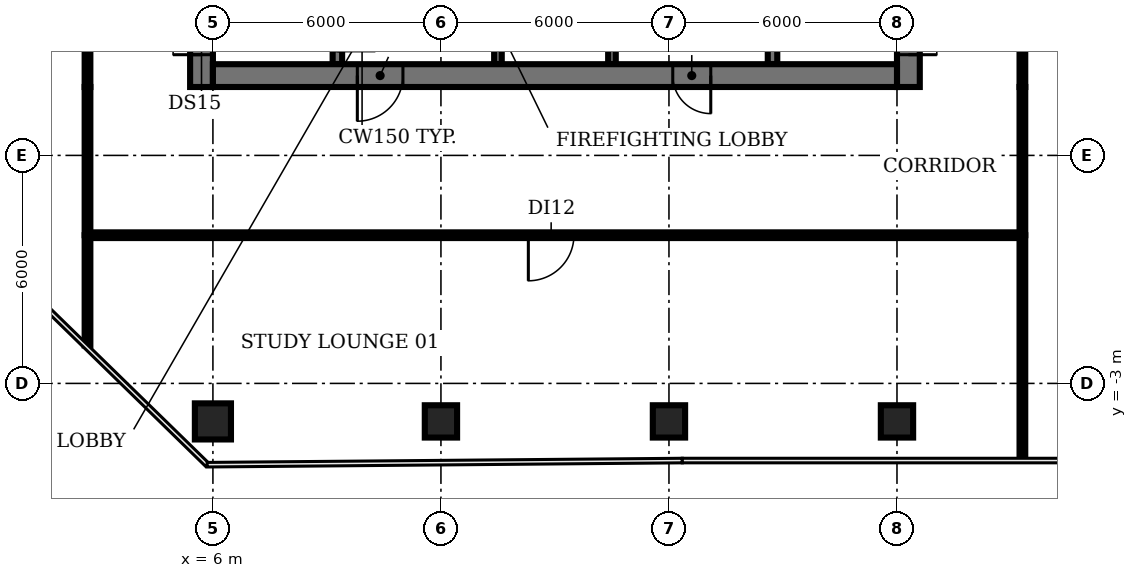
"""IFC4 building model, lengths in metres.
Left out: names, types, materials, properties, quantities, classifications, styles, units other than length and angle.
Written with IfcOpenShell. Run it as: python <this file> out.ifc"""

import sys

from ifc_helpers import new_model, si_unit, direction, frame, frame_2d, origin, origin_2d, place, context, subcontext, project, spatial, rectangle, circle, extrude, element, fill, save


model = new_model("IFC4")
c1 = context("Model", 3, precision=1e-05, world=origin(), true_north=direction((0.0, 1.0)))
c2 = subcontext(c1, "Body", "Model", "MODEL_VIEW")
j1 = project(units=[si_unit("LENGTHUNIT", "METRE"), si_unit("PLANEANGLEUNIT", "RADIAN")], contexts=[c1])
p1 = place(None, origin())
s1 = spatial("IfcSite", under=j1, at=p1, CompositionType="ELEMENT")
p2 = place(p1, origin())
s2 = spatial("IfcBuilding", under=s1, at=p2, CompositionType="ELEMENT")
p3 = place(p2, frame((0.0, 0.0, 171.8)))
s3 = spatial("IfcBuildingStorey", under=s2, at=p3, CompositionType="ELEMENT", Elevation=171.8)
p4 = place(p3, frame((6.0, -4.0, 0.0), z_axis=(0.0, 0.0, 1.0), x_axis=(1.0, 0.0, 0.0)))
e1 = element("IfcColumn", 1, at=p4, inside=s3, PredefinedType="COLUMN", context=c2, shape_type="SweptSolid", body=[
    extrude(circle(Radius=0.475, at=origin_2d()), origin(), (0.0, 0.0, 1.0), 3.85),
])
for number, where, z_axis, x_axis in (
    (2, (12.0, -4.0, 0.0), (0.0, 0.0, 1.0), (1.0, 0.0, 0.0)),
    (3, (18.0, -4.0, 0.0), (0.0, 0.0, 1.0), (1.0, 0.0, 0.0)),
    (4, (24.0, -4.0, 0.0), (0.0, 0.0, 1.0), (1.0, 0.0, 0.0)),
):
    element("IfcColumn", number, at=place(p3, frame(where, z_axis=z_axis, x_axis=x_axis)), inside=s3, PredefinedType="COLUMN", context=c2, shape_type="SweptSolid", body=[
        extrude(rectangle(XDim=0.85, YDim=0.85, at=origin_2d()), origin(), (0.0, 0.0, 1.0), 3.85),
    ])
p5 = place(p3, frame((9.275, 11.825, 0.0), z_axis=(0.0, 0.0, 1.0), x_axis=(0.0, -1.0, 0.0)))
e5 = element("IfcWall", 5, at=p5, inside=s3, PredefinedType="SHEAR", context=c2, shape_type="SweptSolid", body=[
    extrude(rectangle(XDim=6.425, YDim=0.25, at=frame_2d((3.212, 0.0))), origin(), (0.0, 0.0, 1.0), 3.85),
])
p6 = place(p5, frame((5.075, 0.0, 0.0)))
e6 = element("IfcOpeningElement", 6, at=p6, cuts=e5, PredefinedType="OPENING", context=c2, shape_type="SweptSolid", body=[
    extrude(rectangle(XDim=1.0, YDim=2.1, at=frame_2d((0.5, 1.05))), frame((0.0, 0.135, 0.0), z_axis=(0.0, -1.0, 0.0), x_axis=(1.0, 0.0, 0.0)), (0.0, 0.0, 1.0), 0.27),
])
p7 = place(p3, frame((13.5, 5.4, 0.0), z_axis=(0.0, 0.0, 1.0), x_axis=(0.0, 1.0, 0.0)))
e7 = element("IfcWall", 7, at=p7, inside=s3, PredefinedType="SHEAR", context=c2, shape_type="SweptSolid", body=[
    extrude(rectangle(XDim=8.2, YDim=0.2, at=frame_2d((4.1, 0.0))), origin(), (0.0, 0.0, 1.0), 3.85),
])
p8 = place(p7, frame((0.75, 0.0, 0.0)))
e8 = element("IfcOpeningElement", 8, at=p8, cuts=e7, PredefinedType="OPENING", context=c2, shape_type="SweptSolid", body=[
    extrude(rectangle(XDim=1.1, YDim=2.1, at=frame_2d((0.55, 1.05))), frame((0.0, 0.11, 0.0), z_axis=(0.0, -1.0, 0.0), x_axis=(1.0, 0.0, 0.0)), (0.0, 0.0, 1.0), 0.22),
])
p9 = place(p7, frame((3.55, 0.0, 0.0)))
e9 = element("IfcOpeningElement", 9, at=p9, cuts=e7, PredefinedType="OPENING", context=c2, shape_type="SweptSolid", body=[
    extrude(rectangle(XDim=1.1, YDim=2.1, at=frame_2d((0.55, 1.05))), frame((0.0, 0.11, 0.0), z_axis=(0.0, -1.0, 0.0), x_axis=(1.0, 0.0, 0.0)), (0.0, 0.0, 1.0), 0.22),
])
p10 = place(p7, frame((6.35, 0.0, 0.0)))
e10 = element("IfcOpeningElement", 10, at=p10, cuts=e7, PredefinedType="OPENING", context=c2, shape_type="SweptSolid", body=[
    extrude(rectangle(XDim=1.1, YDim=2.1, at=frame_2d((0.55, 1.05))), frame((0.0, 0.11, 0.0), z_axis=(0.0, -1.0, 0.0), x_axis=(1.0, 0.0, 0.0)), (0.0, 0.0, 1.0), 0.22),
])
p11 = place(p3, frame((16.5, 5.4, 0.0), z_axis=(0.0, 0.0, 1.0), x_axis=(0.0, 1.0, 0.0)))
e11 = element("IfcWall", 11, at=p11, inside=s3, PredefinedType="SHEAR", context=c2, shape_type="SweptSolid", body=[
    extrude(rectangle(XDim=8.2, YDim=0.2, at=frame_2d((4.1, 0.0))), origin(), (0.0, 0.0, 1.0), 3.85),
])
p12 = place(p3, frame((20.725, 5.4, 0.0), z_axis=(0.0, 0.0, 1.0), x_axis=(0.0, 1.0, 0.0)))
e12 = element("IfcWall", 12, at=p12, inside=s3, PredefinedType="SHEAR", context=c2, shape_type="SweptSolid", body=[
    extrude(rectangle(XDim=6.3, YDim=0.25, at=frame_2d((3.15, 0.0))), origin(), (0.0, 0.0, 1.0), 3.85),
])
p13 = place(p3, frame((5.7, 4.8, 0.0), z_axis=(0.0, 0.0, 1.0), x_axis=(0.0, 1.0, 0.0)))
e13 = element("IfcWall", 13, at=p13, inside=s3, PredefinedType="SHEAR", context=c2, shape_type="SweptSolid", body=[
    extrude(rectangle(XDim=20.6, YDim=0.6, at=frame_2d((10.3, 0.0))), origin(), (0.0, 0.0, 1.0), 3.85),
])
p14 = place(p13, frame((0.85, 0.0, 0.0)))
e14 = element("IfcOpeningElement", 14, at=p14, cuts=e13, PredefinedType="OPENING", context=c2, shape_type="SweptSolid", body=[
    extrude(rectangle(XDim=1.5, YDim=2.1, at=frame_2d((0.75, 1.05))), frame((0.0, 0.31, 0.0), z_axis=(0.0, -1.0, 0.0), x_axis=(1.0, 0.0, 0.0)), (0.0, 0.0, 1.0), 0.62),
])
p15 = place(p13, frame((7.3, 0.0, 0.0)))
e15 = element("IfcOpeningElement", 15, at=p15, cuts=e13, PredefinedType="OPENING", context=c2, shape_type="SweptSolid", body=[
    extrude(rectangle(XDim=1.2, YDim=2.1, at=frame_2d((0.6, 1.05))), frame((0.0, 0.31, 0.0), z_axis=(0.0, -1.0, 0.0), x_axis=(1.0, 0.0, 0.0)), (0.0, 0.0, 1.0), 0.62),
])
p16 = place(p13, frame((13.85, 0.0, 0.0)))
e16 = element("IfcOpeningElement", 16, at=p16, cuts=e13, PredefinedType="OPENING", context=c2, shape_type="SweptSolid", body=[
    extrude(rectangle(XDim=1.2, YDim=2.1, at=frame_2d((0.6, 1.05))), frame((0.0, 0.31, 0.0), z_axis=(0.0, -1.0, 0.0), x_axis=(1.0, 0.0, 0.0)), (0.0, 0.0, 1.0), 0.62),
])
p17 = place(p3, frame((24.3, 25.555, 0.0), z_axis=(0.0, 0.0, 1.0), x_axis=(0.0, -1.0, 0.0)))
e17 = element("IfcWall", 17, at=p17, inside=s3, PredefinedType="SHEAR", context=c2, shape_type="SweptSolid", body=[
    extrude(rectangle(XDim=20.755, YDim=0.6, at=frame_2d((10.377, 0.0))), origin(), (0.0, 0.0, 1.0), 3.85),
])
p18 = place(p17, frame((18.405, 0.0, 0.0)))
e18 = element("IfcOpeningElement", 18, at=p18, cuts=e17, PredefinedType="OPENING", context=c2, shape_type="SweptSolid", body=[
    extrude(rectangle(XDim=1.5, YDim=2.1, at=frame_2d((0.75, 1.05))), frame((0.0, 0.31, 0.0), z_axis=(0.0, -1.0, 0.0), x_axis=(1.0, 0.0, 0.0)), (0.0, 0.0, 1.0), 0.62),
])
p19 = place(p17, frame((12.305, 0.0, 0.0)))
e19 = element("IfcOpeningElement", 19, at=p19, cuts=e17, PredefinedType="OPENING", context=c2, shape_type="SweptSolid", body=[
    extrude(rectangle(XDim=0.9, YDim=2.1, at=frame_2d((0.45, 1.05))), frame((0.0, 0.31, 0.0), z_axis=(0.0, -1.0, 0.0), x_axis=(1.0, 0.0, 0.0)), (0.0, 0.0, 1.0), 0.62),
])
p20 = place(p17, frame((6.305, 0.0, 0.0)))
e20 = element("IfcOpeningElement", 20, at=p20, cuts=e17, PredefinedType="OPENING", context=c2, shape_type="SweptSolid", body=[
    extrude(rectangle(XDim=2.0, YDim=2.1, at=frame_2d((1.0, 1.05))), frame((0.0, 0.31, 0.0), z_axis=(0.0, -1.0, 0.0), x_axis=(1.0, 0.0, 0.0)), (0.0, 0.0, 1.0), 0.62),
])
p21 = place(p3, frame((24.0, 5.1, 0.0), z_axis=(0.0, 0.0, 1.0), x_axis=(-1.0, 0.0, 0.0)))
e21 = element("IfcWall", 21, at=p21, inside=s3, PredefinedType="SHEAR", context=c2, shape_type="SweptSolid", body=[
    extrude(rectangle(XDim=18.0, YDim=0.6, at=frame_2d((9.0, 0.0))), origin(), (0.0, 0.0, 1.0), 3.85),
])
p22 = place(p21, frame((13.0, 0.0, 0.0)))
e22 = element("IfcOpeningElement", 22, at=p22, cuts=e21, PredefinedType="OPENING", context=c2, shape_type="SweptSolid", body=[
    extrude(rectangle(XDim=1.2, YDim=2.1, at=frame_2d((0.6, 1.05))), frame((0.0, 0.31, 0.0), z_axis=(0.0, -1.0, 0.0), x_axis=(1.0, 0.0, 0.0)), (0.0, 0.0, 1.0), 0.62),
])
p23 = place(p21, frame((4.9, 0.0, 0.0)))
e23 = element("IfcOpeningElement", 23, at=p23, cuts=e21, PredefinedType="OPENING", context=c2, shape_type="SweptSolid", body=[
    extrude(rectangle(XDim=1.0, YDim=2.1, at=frame_2d((0.5, 1.05))), frame((0.0, 0.31, 0.0), z_axis=(0.0, -1.0, 0.0), x_axis=(1.0, 0.0, 0.0)), (0.0, 0.0, 1.0), 0.62),
])
p24 = place(p3, frame((2.7, -2.0, 0.0), z_axis=(0.0, 0.0, 1.0), x_axis=(0.0, 1.0, 0.0)))
e24 = element("IfcWall", 24, at=p24, inside=s3, PredefinedType="PARTITIONING", context=c2, shape_type="SweptSolid", body=[
    extrude(rectangle(XDim=2.9, YDim=0.15, at=frame_2d((1.45, 0.0))), origin(), (0.0, 0.0, 1.0), 2.88),
])
p25 = place(p3, frame((2.7, 0.9, 0.0), z_axis=(0.0, 0.0, 1.0), x_axis=(0.0, 1.0, 0.0)))
e25 = element("IfcWall", 25, at=p25, inside=s3, PredefinedType="PARTITIONING", context=c2, shape_type="SweptSolid", body=[
    extrude(rectangle(XDim=3.9, YDim=0.15, at=frame_2d((1.95, 0.0))), origin(), (0.0, 0.0, 1.0), 2.88),
])
p26 = place(p3, frame((2.7, 4.8, 0.0), z_axis=(0.0, 0.0, 1.0), x_axis=(0.0, 1.0, 0.0)))
e26 = element("IfcWall", 26, at=p26, inside=s3, PredefinedType="PARTITIONING", context=c2, shape_type="SweptSolid", body=[
    extrude(rectangle(XDim=20.6, YDim=0.15, at=frame_2d((10.3, 0.0))), origin(), (0.0, 0.0, 1.0), 2.88),
])
p27 = place(p26, frame((10.2, 0.0, 0.0)))
e27 = element("IfcOpeningElement", 27, at=p27, cuts=e26, PredefinedType="OPENING", context=c2, shape_type="SweptSolid", body=[
    extrude(rectangle(XDim=1.2, YDim=2.1, at=frame_2d((0.6, 1.05))), frame((0.0, 0.085, 0.0), z_axis=(0.0, -1.0, 0.0), x_axis=(1.0, 0.0, 0.0)), (0.0, 0.0, 1.0), 0.17),
])
p28 = place(p3, frame((27.3, -4.98, 0.0), z_axis=(0.0, 0.0, 1.0), x_axis=(0.0, 1.0, 0.0)))
e28 = element("IfcWall", 28, at=p28, inside=s3, PredefinedType="PARTITIONING", context=c2, shape_type="SweptSolid", body=[
    extrude(rectangle(XDim=5.88, YDim=0.15, at=frame_2d((2.94, 0.0))), origin(), (0.0, 0.0, 1.0), 2.88),
])
p29 = place(p3, frame((27.3, 0.9, 0.0), z_axis=(0.0, 0.0, 1.0), x_axis=(-1.0, 0.0, 0.0)))
e29 = element("IfcWall", 29, at=p29, inside=s3, PredefinedType="PARTITIONING", context=c2, shape_type="SweptSolid", body=[
    extrude(rectangle(XDim=24.6, YDim=0.15, at=frame_2d((12.3, 0.0))), origin(), (0.0, 0.0, 1.0), 2.88),
])
p30 = place(p29, frame((11.8, 0.0, 0.0)))
e30 = element("IfcOpeningElement", 30, at=p30, cuts=e29, PredefinedType="OPENING", context=c2, shape_type="SweptSolid", body=[
    extrude(rectangle(XDim=1.2, YDim=2.1, at=frame_2d((0.6, 1.05))), frame((0.0, 0.085, 0.0), z_axis=(0.0, -1.0, 0.0), x_axis=(1.0, 0.0, 0.0)), (0.0, 0.0, 1.0), 0.17),
])
p31 = place(p3, frame((27.3, 0.9, 0.0), z_axis=(0.0, 0.0, 1.0), x_axis=(0.0, 1.0, 0.0)))
e31 = element("IfcWall", 31, at=p31, inside=s3, PredefinedType="PARTITIONING", context=c2, shape_type="SweptSolid", body=[
    extrude(rectangle(XDim=3.9, YDim=0.15, at=frame_2d((1.95, 0.0))), origin(), (0.0, 0.0, 1.0), 2.88),
])
p32 = place(p3, frame((27.3, 4.8, 0.0), z_axis=(0.0, 0.0, 1.0), x_axis=(0.0, 1.0, 0.0)))
e32 = element("IfcWall", 32, at=p32, inside=s3, PredefinedType="PARTITIONING", context=c2, shape_type="SweptSolid", body=[
    extrude(rectangle(XDim=10.0, YDim=0.15, at=frame_2d((5.0, 0.0))), origin(), (0.0, 0.0, 1.0), 2.88),
])
p33 = place(p32, frame((4.4, 0.0, 0.0)))
e33 = element("IfcOpeningElement", 33, at=p33, cuts=e32, PredefinedType="OPENING", context=c2, shape_type="SweptSolid", body=[
    extrude(rectangle(XDim=1.2, YDim=2.1, at=frame_2d((0.6, 1.05))), frame((0.0, 0.085, 0.0), z_axis=(0.0, -1.0, 0.0), x_axis=(1.0, 0.0, 0.0)), (0.0, 0.0, 1.0), 0.17),
])
p34 = place(p14, origin())
e34 = element("IfcDoor", 34, at=p34, inside=s3, OperationType="DOUBLE_DOOR_SINGLE_SWING", PredefinedType="DOOR", context=c2, shape_type="SweptSolid", body=[
    extrude(rectangle(XDim=1.5, YDim=2.1, at=frame_2d((0.75, 1.05))), frame((0.0, 0.025, 0.0), z_axis=(0.0, -1.0, 0.0), x_axis=(1.0, 0.0, 0.0)), (0.0, 0.0, 1.0), 0.05),
])
fill(e14, e34)
p35 = place(p18, origin())
e35 = element("IfcDoor", 35, at=p35, inside=s3, OperationType="DOUBLE_DOOR_SINGLE_SWING", PredefinedType="DOOR", context=c2, shape_type="SweptSolid", body=[
    extrude(rectangle(XDim=1.5, YDim=2.1, at=frame_2d((0.75, 1.05))), frame((0.0, 0.025, 0.0), z_axis=(0.0, -1.0, 0.0), x_axis=(1.0, 0.0, 0.0)), (0.0, 0.0, 1.0), 0.05),
])
fill(e18, e35)
p36 = place(p22, origin())
e36 = element("IfcDoor", 36, at=p36, inside=s3, OperationType="SINGLE_SWING_RIGHT", PredefinedType="DOOR", context=c2, shape_type="SweptSolid", body=[
    extrude(rectangle(XDim=1.2, YDim=2.1, at=frame_2d((0.6, 1.05))), frame((0.0, 0.025, 0.0), z_axis=(0.0, -1.0, 0.0), x_axis=(1.0, 0.0, 0.0)), (0.0, 0.0, 1.0), 0.05),
])
fill(e22, e36)
p37 = place(p23, origin())
e37 = element("IfcDoor", 37, at=p37, inside=s3, OperationType="SINGLE_SWING_LEFT", PredefinedType="DOOR", context=c2, shape_type="SweptSolid", body=[
    extrude(rectangle(XDim=1.0, YDim=2.1, at=frame_2d((0.5, 1.05))), frame((0.0, -0.24, 0.0), z_axis=(0.0, -1.0, 0.0), x_axis=(1.0, 0.0, 0.0)), (0.0, 0.0, 1.0), 0.05),
])
fill(e23, e37)
p38 = place(p30, origin())
e38 = element("IfcDoor", 38, at=p38, inside=s3, OperationType="SINGLE_SWING_RIGHT", PredefinedType="DOOR", context=c2, shape_type="SweptSolid", body=[
    extrude(rectangle(XDim=1.2, YDim=2.1, at=frame_2d((0.6, 1.05))), frame((0.0, 0.025, 0.0), z_axis=(0.0, -1.0, 0.0), x_axis=(1.0, 0.0, 0.0)), (0.0, 0.0, 1.0), 0.05),
])
fill(e30, e38)
save(model, sys.argv[1])
